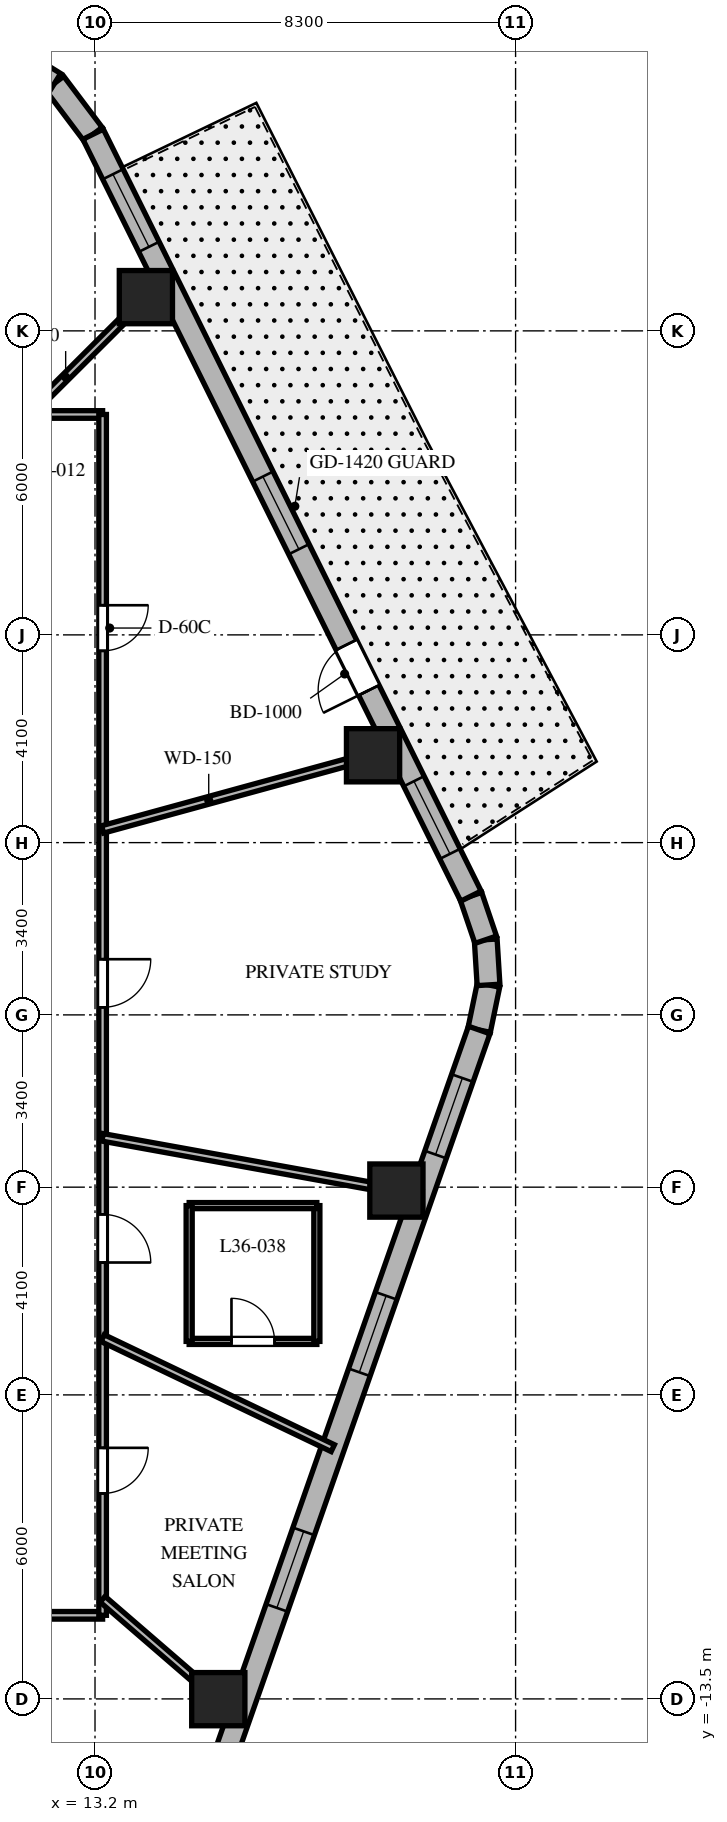
"""IFC4 building model, lengths in metres.
Left out: names, types, materials, properties, quantities, classifications, styles, units other than length and angle.
Written with IfcOpenShell. Run it as: python <this file> out.ifc"""

import sys

from ifc_helpers import new_model, si_unit, direction, frame, frame_2d, origin, origin_2d, place, context, subcontext, project, spatial, rectangle, extrude, element, fill, save


model = new_model("IFC4")
c1 = context("Model", 3, precision=1e-05, world=origin(), true_north=direction((0.0, 1.0)))
c2 = subcontext(c1, "Body", "Model", "MODEL_VIEW")
j1 = project(units=[si_unit("LENGTHUNIT", "METRE"), si_unit("PLANEANGLEUNIT", "RADIAN")], contexts=[c1])
p1 = place(None, origin())
s1 = spatial("IfcSite", under=j1, at=p1, CompositionType="ELEMENT")
p2 = place(p1, origin())
s2 = spatial("IfcBuilding", under=s1, at=p2, CompositionType="ELEMENT")
p3 = place(p2, frame((0.0, 0.0, 148.0)))
s3 = spatial("IfcBuildingStorey", under=s2, at=p3, CompositionType="ELEMENT", Elevation=148.0)
for number, where, z_axis, x_axis in (
    (1, (15.633, -13.505, 0.0), (0.0, 0.0, 1.0), (1.0, 0.0, 0.0)),
    (2, (19.148, -3.467, 0.0), (0.0, 0.0, 1.0), (1.0, 0.0, 0.0)),
    (3, (18.687, 5.124, 0.0), (0.0, 0.0, 1.0), (1.0, 0.0, 0.0)),
    (4, (14.204, 14.166, 0.0), (0.0, 0.0, 1.0), (1.0, 0.0, 0.0)),
):
    element("IfcColumn", number, at=place(p3, frame(where, z_axis=z_axis, x_axis=x_axis)), inside=s3, PredefinedType="COLUMN", context=c2, shape_type="SweptSolid", body=[
        extrude(rectangle(XDim=1.05, YDim=1.05, at=origin_2d()), origin(), (0.0, 0.0, 1.0), 3.7),
    ])
p4 = place(p3, frame((20.782, -0.298, 0.0), z_axis=(0.0, 0.0, 1.0), x_axis=(0.202570068411, 0.979267771033, 0.0)))
e5 = element("IfcWall", 5, at=p4, inside=s3, PredefinedType="SOLIDWALL", context=c2, shape_type="SweptSolid", body=[
    extrude(rectangle(XDim=0.909, YDim=0.45, at=frame_2d((0.454, 0.0))), origin(), (0.0, 0.0, 1.0), 3.4),
])
p5 = place(p3, frame((20.966, 0.592, 0.0), z_axis=(0.0, 0.0, 1.0), x_axis=(-0.061748898935, 0.998091715966, 0.0)))
e6 = element("IfcWall", 6, at=p5, inside=s3, PredefinedType="SOLIDWALL", context=c2, shape_type="SweptSolid", body=[
    extrude(rectangle(XDim=0.894, YDim=0.45, at=frame_2d((0.447, 0.0))), origin(), (0.0, 0.0, 1.0), 3.4),
])
p6 = place(p3, frame((20.911, 1.484, 0.0), z_axis=(0.0, 0.0, 1.0), x_axis=(-0.321623334353, 0.946867694453, 0.0)))
e7 = element("IfcWall", 7, at=p6, inside=s3, PredefinedType="SOLIDWALL", context=c2, shape_type="SweptSolid", body=[
    extrude(rectangle(XDim=0.909, YDim=0.45, at=frame_2d((0.454, 0.0))), origin(), (0.0, 0.0, 1.0), 3.4),
])
p7 = place(p3, frame((13.162, 17.381, 0.0), z_axis=(0.0, 0.0, 1.0), x_axis=(-0.601515770517, 0.798860925205, 0.0)))
e8 = element("IfcWall", 8, at=p7, inside=s3, PredefinedType="SOLIDWALL", context=c2, shape_type="SweptSolid", body=[
    extrude(rectangle(XDim=1.262, YDim=0.45, at=frame_2d((0.631, 0.0))), origin(), (0.0, 0.0, 1.0), 3.4),
])
p8 = place(p3, frame((12.403, 18.389, 0.0), z_axis=(0.0, 0.0, 1.0), x_axis=(-0.849795170926, 0.527113049991, 0.0)))
e9 = element("IfcWall", 9, at=p8, inside=s3, PredefinedType="SOLIDWALL", context=c2, shape_type="SweptSolid", body=[
    extrude(rectangle(XDim=1.241, YDim=0.45, at=frame_2d((0.62, 0.0))), origin(), (0.0, 0.0, 1.0), 3.4),
])
p9 = place(p3, frame((14.937, -16.993, 0.0), z_axis=(0.0, 0.0, 1.0), x_axis=(0.330431575061, 0.943829949834, 0.0)))
e10 = element("IfcWall", 10, at=p9, inside=s3, PredefinedType="SOLIDWALL", context=c2, shape_type="SweptSolid", body=[
    extrude(rectangle(XDim=17.689, YDim=0.45, at=frame_2d((8.844, 0.0))), origin(), (0.0, 0.0, 1.0), 3.4),
])
p10 = place(p9, frame((0.95, 0.0, 0.8)))
e11 = element("IfcOpeningElement", 11, at=p10, cuts=e10, PredefinedType="OPENING", context=c2, shape_type="SweptSolid", body=[
    extrude(rectangle(XDim=1.6, YDim=1.75, at=frame_2d((0.8, 0.875))), frame((0.0, 0.235, 0.0), z_axis=(0.0, -1.0, 0.0), x_axis=(1.0, 0.0, 0.0)), (0.0, 0.0, 1.0), 0.47),
])
p11 = place(p9, frame((5.605, 0.0, 0.8)))
e12 = element("IfcOpeningElement", 12, at=p11, cuts=e10, PredefinedType="OPENING", context=c2, shape_type="SweptSolid", body=[
    extrude(rectangle(XDim=1.6, YDim=1.75, at=frame_2d((0.8, 0.875))), frame((0.0, 0.235, 0.0), z_axis=(0.0, -1.0, 0.0), x_axis=(1.0, 0.0, 0.0)), (0.0, 0.0, 1.0), 0.47),
])
p12 = place(p9, frame((10.531, 0.0, 0.8)))
e13 = element("IfcOpeningElement", 13, at=p12, cuts=e10, PredefinedType="OPENING", context=c2, shape_type="SweptSolid", body=[
    extrude(rectangle(XDim=1.6, YDim=1.75, at=frame_2d((0.8, 0.875))), frame((0.0, 0.235, 0.0), z_axis=(0.0, -1.0, 0.0), x_axis=(1.0, 0.0, 0.0)), (0.0, 0.0, 1.0), 0.47),
])
p13 = place(p9, frame((15.084, 0.0, 0.8)))
e14 = element("IfcOpeningElement", 14, at=p13, cuts=e10, PredefinedType="OPENING", context=c2, shape_type="SweptSolid", body=[
    extrude(rectangle(XDim=1.6, YDim=1.75, at=frame_2d((0.8, 0.875))), frame((0.0, 0.235, 0.0), z_axis=(0.0, -1.0, 0.0), x_axis=(1.0, 0.0, 0.0)), (0.0, 0.0, 1.0), 0.47),
])
p14 = place(p3, frame((20.618, 2.344, 0.0), z_axis=(0.0, 0.0, 1.0), x_axis=(-0.444243691097, 0.895905990002, 0.0)))
e15 = element("IfcWall", 15, at=p14, inside=s3, PredefinedType="SOLIDWALL", context=c2, shape_type="SweptSolid", body=[
    extrude(rectangle(XDim=16.784, YDim=0.45, at=frame_2d((8.392, 0.0))), origin(), (0.0, 0.0, 1.0), 3.4),
])
p15 = place(p14, frame((4.535, 0.0, 0.0)))
e16 = element("IfcOpeningElement", 16, at=p15, cuts=e15, PredefinedType="OPENING", context=c2, shape_type="SweptSolid", body=[
    extrude(rectangle(XDim=1.0, YDim=2.15, at=frame_2d((0.5, 1.075))), frame((0.0, 0.235, 0.0), z_axis=(0.0, -1.0, 0.0), x_axis=(1.0, 0.0, 0.0)), (0.0, 0.0, 1.0), 0.47),
])
p16 = place(p14, frame((7.642, 0.0, 0.8)))
e17 = element("IfcOpeningElement", 17, at=p16, cuts=e15, PredefinedType="OPENING", context=c2, shape_type="SweptSolid", body=[
    extrude(rectangle(XDim=1.6, YDim=1.75, at=frame_2d((0.8, 0.875))), frame((0.0, 0.235, 0.0), z_axis=(0.0, -1.0, 0.0), x_axis=(1.0, 0.0, 0.0)), (0.0, 0.0, 1.0), 0.47),
])
p17 = place(p14, frame((14.303, 0.0, 0.8)))
e18 = element("IfcOpeningElement", 18, at=p17, cuts=e15, PredefinedType="OPENING", context=c2, shape_type="SweptSolid", body=[
    extrude(rectangle(XDim=1.6, YDim=1.75, at=frame_2d((0.8, 0.875))), frame((0.0, 0.235, 0.0), z_axis=(0.0, -1.0, 0.0), x_axis=(1.0, 0.0, 0.0)), (0.0, 0.0, 1.0), 0.47),
])
p18 = place(p14, frame((0.931, 0.0, 0.8)))
e19 = element("IfcOpeningElement", 19, at=p18, cuts=e15, PredefinedType="OPENING", context=c2, shape_type="SweptSolid", body=[
    extrude(rectangle(XDim=1.6, YDim=1.75, at=frame_2d((0.8, 0.875))), frame((0.0, 0.235, 0.0), z_axis=(0.0, -1.0, 0.0), x_axis=(1.0, 0.0, 0.0)), (0.0, 0.0, 1.0), 0.47),
])
p19 = place(p3, frame((13.35, -11.85, 0.0), z_axis=(0.0, 0.0, 1.0), x_axis=(-1.0, 0.0, 0.0)))
e20 = element("IfcWall", 20, at=p19, inside=s3, PredefinedType="PARTITIONING", context=c2, shape_type="SweptSolid", body=[
    extrude(rectangle(XDim=26.7, YDim=0.15, at=frame_2d((13.35, 0.0))), origin(), (0.0, 0.0, 1.0), 2.84),
])
p20 = place(p19, frame((20.682, 0.0, 0.0)))
e21 = element("IfcOpeningElement", 21, at=p20, cuts=e20, PredefinedType="OPENING", context=c2, shape_type="SweptSolid", body=[
    extrude(rectangle(XDim=0.95, YDim=2.03, at=frame_2d((0.475, 1.015))), frame((0.0, 0.085, 0.0), z_axis=(0.0, -1.0, 0.0), x_axis=(1.0, 0.0, 0.0)), (0.0, 0.0, 1.0), 0.17),
])
p21 = place(p19, frame((12.362, 0.0, 0.0)))
e22 = element("IfcOpeningElement", 22, at=p21, cuts=e20, PredefinedType="OPENING", context=c2, shape_type="SweptSolid", body=[
    extrude(rectangle(XDim=0.95, YDim=2.03, at=frame_2d((0.475, 1.015))), frame((0.0, 0.085, 0.0), z_axis=(0.0, -1.0, 0.0), x_axis=(1.0, 0.0, 0.0)), (0.0, 0.0, 1.0), 0.17),
])
p22 = place(p19, frame((3.995, 0.0, 0.0)))
e23 = element("IfcOpeningElement", 23, at=p22, cuts=e20, PredefinedType="OPENING", context=c2, shape_type="SweptSolid", body=[
    extrude(rectangle(XDim=0.95, YDim=2.03, at=frame_2d((0.475, 1.015))), frame((0.0, 0.085, 0.0), z_axis=(0.0, -1.0, 0.0), x_axis=(1.0, 0.0, 0.0)), (0.0, 0.0, 1.0), 0.17),
])
p23 = place(p3, frame((-13.35, 11.85, 0.0), z_axis=(0.0, 0.0, 1.0), x_axis=(1.0, 0.0, 0.0)))
e24 = element("IfcWall", 24, at=p23, inside=s3, PredefinedType="PARTITIONING", context=c2, shape_type="SweptSolid", body=[
    extrude(rectangle(XDim=26.7, YDim=0.15, at=frame_2d((13.35, 0.0))), origin(), (0.0, 0.0, 1.0), 2.84),
])
p24 = place(p23, frame((20.682, 0.0, 0.0)))
e25 = element("IfcOpeningElement", 25, at=p24, cuts=e24, PredefinedType="OPENING", context=c2, shape_type="SweptSolid", body=[
    extrude(rectangle(XDim=0.95, YDim=2.03, at=frame_2d((0.475, 1.015))), frame((0.0, 0.085, 0.0), z_axis=(0.0, -1.0, 0.0), x_axis=(1.0, 0.0, 0.0)), (0.0, 0.0, 1.0), 0.17),
])
p25 = place(p23, frame((14.229, 0.0, 0.0)))
e26 = element("IfcOpeningElement", 26, at=p25, cuts=e24, PredefinedType="OPENING", context=c2, shape_type="SweptSolid", body=[
    extrude(rectangle(XDim=0.95, YDim=2.03, at=frame_2d((0.475, 1.015))), frame((0.0, 0.085, 0.0), z_axis=(0.0, -1.0, 0.0), x_axis=(1.0, 0.0, 0.0)), (0.0, 0.0, 1.0), 0.17),
])
p26 = place(p23, frame((10.075, 0.0, 0.0)))
e27 = element("IfcOpeningElement", 27, at=p26, cuts=e24, PredefinedType="OPENING", context=c2, shape_type="SweptSolid", body=[
    extrude(rectangle(XDim=0.95, YDim=2.03, at=frame_2d((0.475, 1.015))), frame((0.0, 0.085, 0.0), z_axis=(0.0, -1.0, 0.0), x_axis=(1.0, 0.0, 0.0)), (0.0, 0.0, 1.0), 0.17),
])
p27 = place(p23, frame((3.995, 0.0, 0.0)))
e28 = element("IfcOpeningElement", 28, at=p27, cuts=e24, PredefinedType="OPENING", context=c2, shape_type="SweptSolid", body=[
    extrude(rectangle(XDim=0.95, YDim=2.03, at=frame_2d((0.475, 1.015))), frame((0.0, 0.085, 0.0), z_axis=(0.0, -1.0, 0.0), x_axis=(1.0, 0.0, 0.0)), (0.0, 0.0, 1.0), 0.17),
])
p28 = place(p3, frame((13.35, 11.85, 0.0), z_axis=(0.0, 0.0, 1.0), x_axis=(0.0, -1.0, 0.0)))
e29 = element("IfcWall", 29, at=p28, inside=s3, PredefinedType="PARTITIONING", context=c2, shape_type="SweptSolid", body=[
    extrude(rectangle(XDim=23.7, YDim=0.15, at=frame_2d((11.85, 0.0))), origin(), (0.0, 0.0, 1.0), 2.84),
])
p29 = place(p28, frame((3.765, 0.0, 0.0)))
e30 = element("IfcOpeningElement", 30, at=p29, cuts=e29, PredefinedType="OPENING", context=c2, shape_type="SweptSolid", body=[
    extrude(rectangle(XDim=0.9, YDim=2.03, at=frame_2d((0.45, 1.015))), frame((0.0, 0.085, 0.0), z_axis=(0.0, -1.0, 0.0), x_axis=(1.0, 0.0, 0.0)), (0.0, 0.0, 1.0), 0.17),
])
p30 = place(p28, frame((20.395, 0.0, 0.0)))
e31 = element("IfcOpeningElement", 31, at=p30, cuts=e29, PredefinedType="OPENING", context=c2, shape_type="SweptSolid", body=[
    extrude(rectangle(XDim=0.9, YDim=2.03, at=frame_2d((0.45, 1.015))), frame((0.0, 0.085, 0.0), z_axis=(0.0, -1.0, 0.0), x_axis=(1.0, 0.0, 0.0)), (0.0, 0.0, 1.0), 0.17),
])
p31 = place(p28, frame((15.787, 0.0, 0.0)))
e32 = element("IfcOpeningElement", 32, at=p31, cuts=e29, PredefinedType="OPENING", context=c2, shape_type="SweptSolid", body=[
    extrude(rectangle(XDim=0.95, YDim=2.03, at=frame_2d((0.475, 1.015))), frame((0.0, 0.085, 0.0), z_axis=(0.0, -1.0, 0.0), x_axis=(1.0, 0.0, 0.0)), (0.0, 0.0, 1.0), 0.17),
])
p32 = place(p28, frame((10.751, 0.0, 0.0)))
e33 = element("IfcOpeningElement", 33, at=p32, cuts=e29, PredefinedType="OPENING", context=c2, shape_type="SweptSolid", body=[
    extrude(rectangle(XDim=0.95, YDim=2.03, at=frame_2d((0.475, 1.015))), frame((0.0, 0.085, 0.0), z_axis=(0.0, -1.0, 0.0), x_axis=(1.0, 0.0, 0.0)), (0.0, 0.0, 1.0), 0.17),
])
p33 = place(p3, frame((13.35, 3.661, 0.0), z_axis=(0.0, 0.0, 1.0), x_axis=(0.964397145454, 0.264458211898, 0.0)))
e34 = element("IfcWall", 34, at=p33, inside=s3, PredefinedType="PARTITIONING", context=c2, shape_type="SweptSolid", body=[
    extrude(rectangle(XDim=6.039, YDim=0.15, at=frame_2d((3.019, 0.0))), origin(), (0.0, 0.0, 1.0), 2.64),
])
p34 = place(p3, frame((11.882, 11.85, 0.0), z_axis=(0.0, 0.0, 1.0), x_axis=(0.708037373639, 0.706174962407, 0.0)))
e35 = element("IfcWall", 35, at=p34, inside=s3, PredefinedType="PARTITIONING", context=c2, shape_type="SweptSolid", body=[
    extrude(rectangle(XDim=3.802, YDim=0.15, at=frame_2d((1.901, 0.0))), origin(), (0.0, 0.0, 1.0), 2.64),
])
p35 = place(p3, frame((13.35, -11.533, 0.0), z_axis=(0.0, 0.0, 1.0), x_axis=(0.756711647314, -0.65374879183, 0.0)))
e36 = element("IfcWall", 36, at=p35, inside=s3, PredefinedType="PARTITIONING", context=c2, shape_type="SweptSolid", body=[
    extrude(rectangle(XDim=3.55, YDim=0.15, at=frame_2d((1.775, 0.0))), origin(), (0.0, 0.0, 1.0), 2.64),
])
p36 = place(p3, frame((13.35, -6.38, 0.0), z_axis=(0.0, 0.0, 1.0), x_axis=(0.90225728206, -0.431198094812, 0.0)))
e37 = element("IfcWall", 37, at=p36, inside=s3, PredefinedType="PARTITIONING", context=c2, shape_type="SweptSolid", body=[
    extrude(rectangle(XDim=5.035, YDim=0.15, at=frame_2d((2.517, 0.0))), origin(), (0.0, 0.0, 1.0), 2.64),
])
p37 = place(p3, frame((13.35, -2.417, 0.0), z_axis=(0.0, 0.0, 1.0), x_axis=(0.98399796473, -0.178179699761, 0.0)))
e38 = element("IfcWall", 38, at=p37, inside=s3, PredefinedType="PARTITIONING", context=c2, shape_type="SweptSolid", body=[
    extrude(rectangle(XDim=6.393, YDim=0.15, at=frame_2d((3.197, 0.0))), origin(), (0.0, 0.0, 1.0), 2.64),
])
p38 = place(p3, frame((15.058, -6.444, 0.0), z_axis=(0.0, 0.0, 1.0), x_axis=(1.0, 0.0, 0.0)))
e39 = element("IfcWall", 39, at=p38, inside=s3, PredefinedType="PARTITIONING", context=c2, shape_type="SweptSolid", body=[
    extrude(rectangle(XDim=2.52, YDim=0.12, at=frame_2d((1.26, 0.0))), origin(), (0.0, 0.0, 1.0), 2.972),
])
p39 = place(p38, frame((0.835, 0.0, 0.0)))
e40 = element("IfcOpeningElement", 40, at=p39, cuts=e39, PredefinedType="OPENING", context=c2, shape_type="SweptSolid", body=[
    extrude(rectangle(XDim=0.85, YDim=2.03, at=frame_2d((0.425, 1.015))), frame((0.0, 0.07, 0.0), z_axis=(0.0, -1.0, 0.0), x_axis=(1.0, 0.0, 0.0)), (0.0, 0.0, 1.0), 0.14),
])
p40 = place(p3, frame((17.578, -6.444, 0.0), z_axis=(0.0, 0.0, 1.0), x_axis=(0.0, 1.0, 0.0)))
e41 = element("IfcWall", 41, at=p40, inside=s3, PredefinedType="PARTITIONING", context=c2, shape_type="SweptSolid", body=[
    extrude(rectangle(XDim=2.68, YDim=0.12, at=frame_2d((1.34, 0.0))), origin(), (0.0, 0.0, 1.0), 2.84),
])
p41 = place(p3, frame((17.578, -3.764, 0.0), z_axis=(0.0, 0.0, 1.0), x_axis=(-1.0, 0.0, 0.0)))
e42 = element("IfcWall", 42, at=p41, inside=s3, PredefinedType="PARTITIONING", context=c2, shape_type="SweptSolid", body=[
    extrude(rectangle(XDim=2.52, YDim=0.12, at=frame_2d((1.26, 0.0))), origin(), (0.0, 0.0, 1.0), 2.841),
])
p42 = place(p3, frame((15.058, -3.764, 0.0), z_axis=(0.0, 0.0, 1.0), x_axis=(0.0, -1.0, 0.0)))
e43 = element("IfcWall", 43, at=p42, inside=s3, PredefinedType="PARTITIONING", context=c2, shape_type="SweptSolid", body=[
    extrude(rectangle(XDim=2.68, YDim=0.12, at=frame_2d((1.34, 0.0))), origin(), (0.0, 0.0, 1.0), 2.84),
])
p43 = place(p11, origin())
e44 = element("IfcWindow", 44, at=p43, inside=s3, PartitioningType="SINGLE_PANEL", PredefinedType="WINDOW", context=c2, shape_type="SweptSolid", body=[
    extrude(rectangle(XDim=1.6, YDim=1.75, at=frame_2d((0.8, 0.875))), frame((0.0, 0.03, 0.0), z_axis=(0.0, -1.0, 0.0), x_axis=(1.0, 0.0, 0.0)), (0.0, 0.0, 1.0), 0.06),
])
fill(e12, e44)
p44 = place(p12, origin())
e45 = element("IfcWindow", 45, at=p44, inside=s3, PartitioningType="SINGLE_PANEL", PredefinedType="WINDOW", context=c2, shape_type="SweptSolid", body=[
    extrude(rectangle(XDim=1.6, YDim=1.75, at=frame_2d((0.8, 0.875))), frame((0.0, 0.03, 0.0), z_axis=(0.0, -1.0, 0.0), x_axis=(1.0, 0.0, 0.0)), (0.0, 0.0, 1.0), 0.06),
])
fill(e13, e45)
p45 = place(p13, origin())
e46 = element("IfcWindow", 46, at=p45, inside=s3, PartitioningType="SINGLE_PANEL", PredefinedType="WINDOW", context=c2, shape_type="SweptSolid", body=[
    extrude(rectangle(XDim=1.6, YDim=1.75, at=frame_2d((0.8, 0.875))), frame((0.0, 0.03, 0.0), z_axis=(0.0, -1.0, 0.0), x_axis=(1.0, 0.0, 0.0)), (0.0, 0.0, 1.0), 0.06),
])
fill(e14, e46)
p46 = place(p15, origin())
e47 = element("IfcDoor", 47, at=p46, inside=s3, OperationType="SINGLE_SWING_LEFT", PredefinedType="DOOR", context=c2, shape_type="SweptSolid", body=[
    extrude(rectangle(XDim=1.0, YDim=2.15, at=frame_2d((0.5, 1.075))), frame((0.0, 0.025, 0.0), z_axis=(0.0, -1.0, 0.0), x_axis=(1.0, 0.0, 0.0)), (0.0, 0.0, 1.0), 0.05),
])
fill(e16, e47)
p47 = place(p16, origin())
e48 = element("IfcWindow", 48, at=p47, inside=s3, PartitioningType="SINGLE_PANEL", PredefinedType="WINDOW", context=c2, shape_type="SweptSolid", body=[
    extrude(rectangle(XDim=1.6, YDim=1.75, at=frame_2d((0.8, 0.875))), frame((0.0, 0.03, 0.0), z_axis=(0.0, -1.0, 0.0), x_axis=(1.0, 0.0, 0.0)), (0.0, 0.0, 1.0), 0.06),
])
fill(e17, e48)
p48 = place(p17, origin())
e49 = element("IfcWindow", 49, at=p48, inside=s3, PartitioningType="SINGLE_PANEL", PredefinedType="WINDOW", context=c2, shape_type="SweptSolid", body=[
    extrude(rectangle(XDim=1.6, YDim=1.75, at=frame_2d((0.8, 0.875))), frame((0.0, 0.03, 0.0), z_axis=(0.0, -1.0, 0.0), x_axis=(1.0, 0.0, 0.0)), (0.0, 0.0, 1.0), 0.06),
])
fill(e18, e49)
p49 = place(p18, origin())
e50 = element("IfcWindow", 50, at=p49, inside=s3, PartitioningType="SINGLE_PANEL", PredefinedType="WINDOW", context=c2, shape_type="SweptSolid", body=[
    extrude(rectangle(XDim=1.6, YDim=1.75, at=frame_2d((0.8, 0.875))), frame((0.0, 0.03, 0.0), z_axis=(0.0, -1.0, 0.0), x_axis=(1.0, 0.0, 0.0)), (0.0, 0.0, 1.0), 0.06),
])
fill(e19, e50)
p50 = place(p29, origin())
e51 = element("IfcDoor", 51, at=p50, inside=s3, OperationType="SINGLE_SWING_LEFT", PredefinedType="DOOR", context=c2, shape_type="SweptSolid", body=[
    extrude(rectangle(XDim=0.9, YDim=2.03, at=frame_2d((0.45, 1.015))), frame((0.0, 0.025, 0.0), z_axis=(0.0, -1.0, 0.0), x_axis=(1.0, 0.0, 0.0)), (0.0, 0.0, 1.0), 0.05),
])
fill(e30, e51)
p51 = place(p30, origin())
e52 = element("IfcDoor", 52, at=p51, inside=s3, OperationType="SINGLE_SWING_LEFT", PredefinedType="DOOR", context=c2, shape_type="SweptSolid", body=[
    extrude(rectangle(XDim=0.9, YDim=2.03, at=frame_2d((0.45, 1.015))), frame((0.0, 0.025, 0.0), z_axis=(0.0, -1.0, 0.0), x_axis=(1.0, 0.0, 0.0)), (0.0, 0.0, 1.0), 0.05),
])
fill(e31, e52)
p52 = place(p31, origin())
e53 = element("IfcDoor", 53, at=p52, inside=s3, OperationType="SINGLE_SWING_RIGHT", PredefinedType="DOOR", context=c2, shape_type="SweptSolid", body=[
    extrude(rectangle(XDim=0.95, YDim=2.03, at=frame_2d((0.475, 1.015))), frame((0.0, 0.025, 0.0), z_axis=(0.0, -1.0, 0.0), x_axis=(1.0, 0.0, 0.0)), (0.0, 0.0, 1.0), 0.05),
])
fill(e32, e53)
p53 = place(p39, origin())
e54 = element("IfcDoor", 54, at=p53, inside=s3, OperationType="SINGLE_SWING_LEFT", PredefinedType="DOOR", context=c2, shape_type="SweptSolid", body=[
    extrude(rectangle(XDim=0.85, YDim=2.03, at=frame_2d((0.425, 1.015))), frame((0.0, 0.025, 0.0), z_axis=(0.0, -1.0, 0.0), x_axis=(1.0, 0.0, 0.0)), (0.0, 0.0, 1.0), 0.05),
])
fill(e40, e54)
p54 = place(p32, origin())
e55 = element("IfcDoor", 55, at=p54, inside=s3, OperationType="SINGLE_SWING_LEFT", PredefinedType="DOOR", context=c2, shape_type="SweptSolid", body=[
    extrude(rectangle(XDim=0.95, YDim=2.03, at=frame_2d((0.475, 1.015))), frame((0.0, 0.025, 0.0), z_axis=(0.0, -1.0, 0.0), x_axis=(1.0, 0.0, 0.0)), (0.0, 0.0, 1.0), 0.05),
])
fill(e33, e55)
save(model, sys.argv[1])
